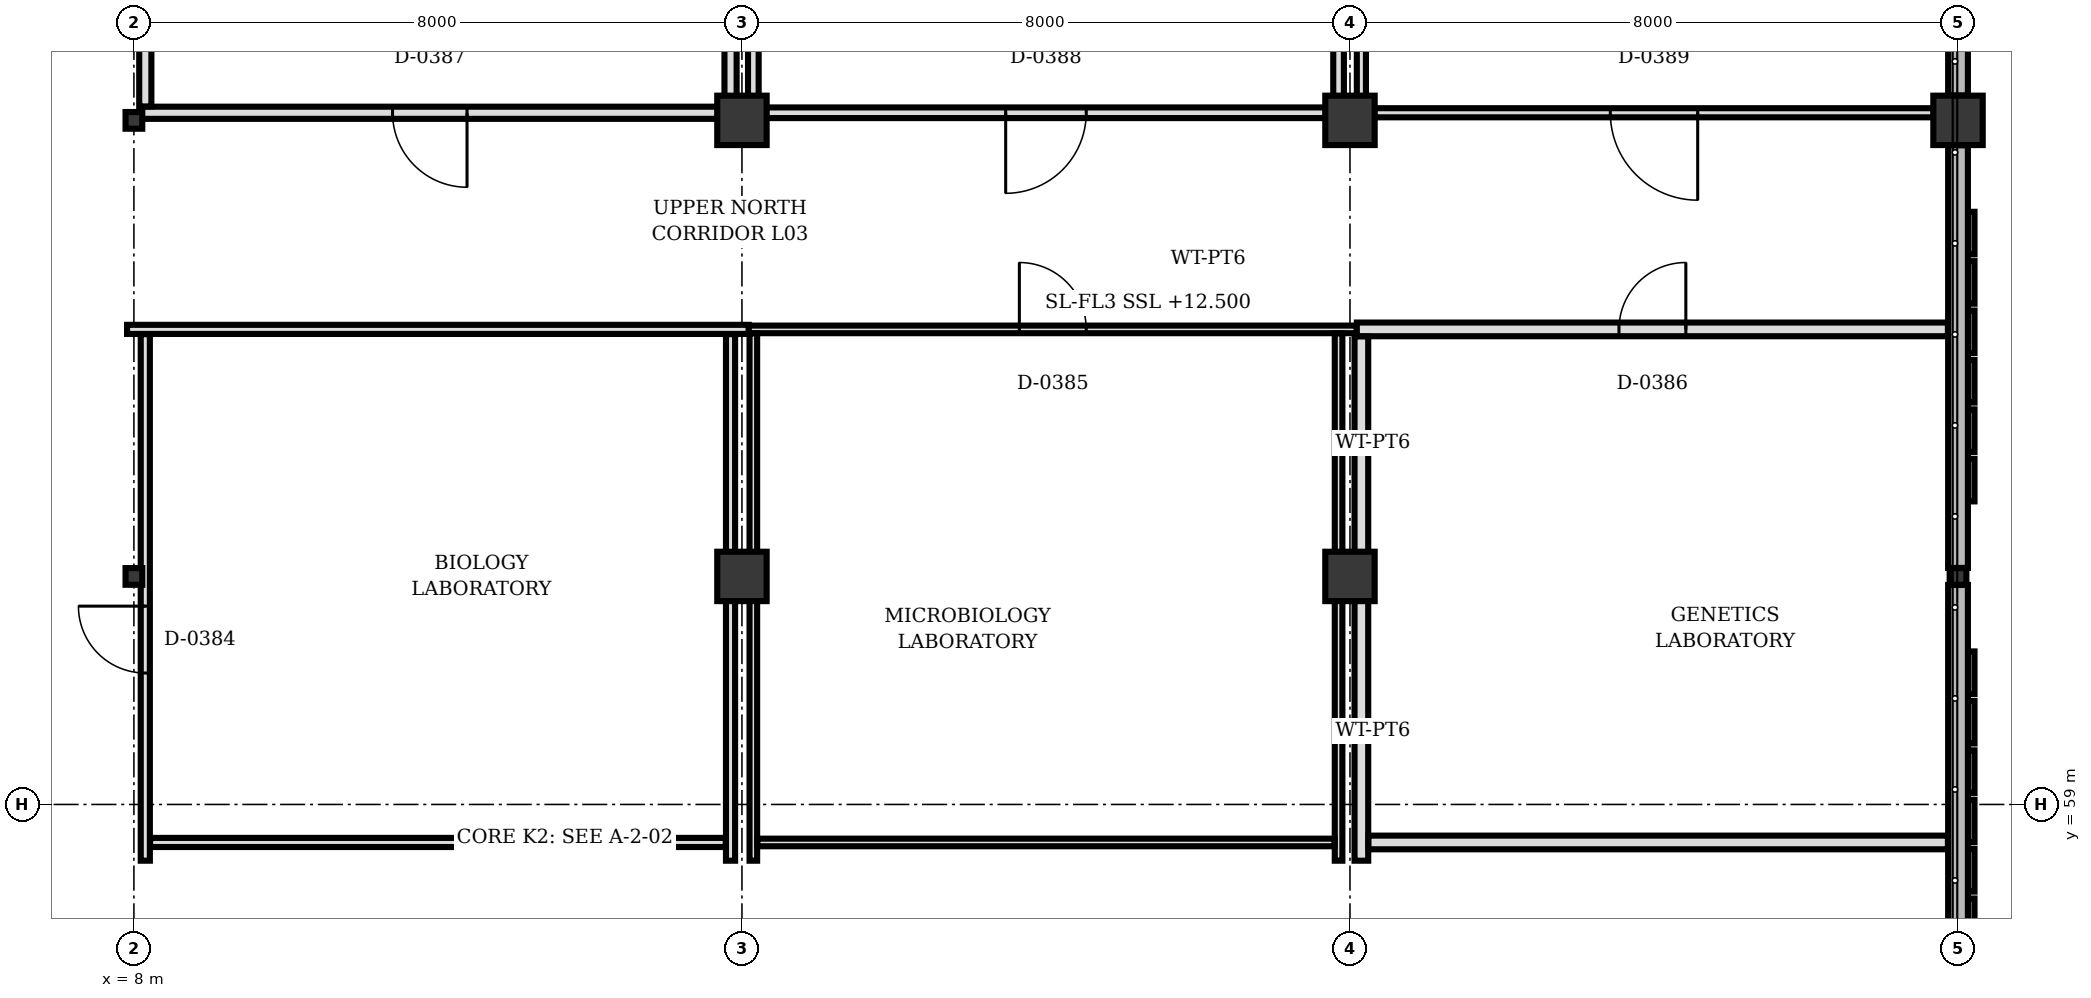
"""IFC4 building model, lengths in metres.
Left out: names, types, materials, properties, quantities, classifications, styles, units other than length and angle.
Written with IfcOpenShell. Run it as: python <this file> out.ifc"""

import sys

from ifc_helpers import new_model, si_unit, direction, frame, frame_2d, origin, origin_2d, place, context, subcontext, project, spatial, rectangle, hollow_rectangle, extrude, element, fill, save


model = new_model("IFC4")
c1 = context("Model", 3, precision=1e-05, world=origin(), true_north=direction((0.0, 1.0)))
c2 = subcontext(c1, "Body", "Model", "MODEL_VIEW")
j1 = project(units=[si_unit("LENGTHUNIT", "METRE"), si_unit("PLANEANGLEUNIT", "RADIAN")], contexts=[c1])
p1 = place(None, origin())
s1 = spatial("IfcSite", under=j1, at=p1, CompositionType="ELEMENT")
p2 = place(p1, origin())
s2 = spatial("IfcBuilding", under=s1, at=p2, CompositionType="ELEMENT")
p3 = place(p2, frame((0.0, 0.0, 12.5)))
s3 = spatial("IfcBuildingStorey", under=s2, at=p3, CompositionType="ELEMENT", Elevation=12.5)
for number, where, z_axis, x_axis in (
    (1, (16.0, 62.0, 0.0), (0.0, 0.0, 1.0), (1.0, 0.0, 0.0)),
    (2, (16.0, 68.0, 0.0), (0.0, 0.0, 1.0), (1.0, 0.0, 0.0)),
    (3, (24.0, 62.0, 0.0), (0.0, 0.0, 1.0), (1.0, 0.0, 0.0)),
    (4, (24.0, 68.0, 0.0), (0.0, 0.0, 1.0), (1.0, 0.0, 0.0)),
):
    element("IfcColumn", number, at=place(p3, frame(where, z_axis=z_axis, x_axis=x_axis)), inside=s3, PredefinedType="COLUMN", context=c2, shape_type="SweptSolid", body=[
        extrude(rectangle(XDim=0.65, YDim=0.65, at=origin_2d()), origin(), (0.0, 0.0, 1.0), 4.0),
    ])
p4 = place(p3, frame((32.0, 62.0, 0.0), z_axis=(0.0, 0.0, 1.0), x_axis=(1.0, 0.0, 0.0)))
e5 = element("IfcColumn", 5, at=p4, inside=s3, PredefinedType="COLUMN", context=c2, shape_type="SweptSolid", body=[
    extrude(hollow_rectangle(XDim=0.22, YDim=0.22, WallThickness=0.01, at=origin_2d()), origin(), (0.0, 0.0, 1.0), 4.0),
])
p5 = place(p3, frame((32.0, 68.0, 0.0), z_axis=(0.0, 0.0, 1.0), x_axis=(1.0, 0.0, 0.0)))
e6 = element("IfcColumn", 6, at=p5, inside=s3, PredefinedType="COLUMN", context=c2, shape_type="SweptSolid", body=[
    extrude(rectangle(XDim=0.65, YDim=0.65, at=origin_2d()), origin(), (0.0, 0.0, 1.0), 4.0),
])
for number, where, z_axis, x_axis in (
    (7, (8.0, 62.0, 0.0), (0.0, 0.0, 1.0), (1.0, 0.0, 0.0)),
    (8, (8.0, 68.0, 0.0), (0.0, 0.0, 1.0), (1.0, 0.0, 0.0)),
):
    element("IfcColumn", number, at=place(p3, frame(where, z_axis=z_axis, x_axis=x_axis)), inside=s3, PredefinedType="COLUMN", context=c2, shape_type="SweptSolid", body=[
        extrude(hollow_rectangle(XDim=0.22, YDim=0.22, WallThickness=0.01, at=origin_2d()), origin(), (0.0, 0.0, 1.0), 4.0),
    ])
p6 = place(p3, frame((32.0, 75.673, 0.0), z_axis=(0.0, 0.0, 1.0), x_axis=(0.0, -1.0, 0.0)))
e9 = element("IfcWall", 9, at=p6, inside=s3, PredefinedType="SOLIDWALL", context=c2, shape_type="SweptSolid", body=[
    extrude(rectangle(XDim=7.346, YDim=0.26, at=frame_2d((3.673, 0.0))), origin(), (0.0, 0.0, 1.0), 3.152),
])
p7 = place(p6, frame((4.889, 0.0, 0.9)))
e10 = element("IfcOpeningElement", 10, at=p7, cuts=e9, PredefinedType="OPENING", context=c2, shape_type="SweptSolid", body=[
    extrude(rectangle(XDim=0.8, YDim=1.1, at=frame_2d((0.4, 0.55))), frame((0.0, 0.14, 0.0), z_axis=(0.0, -1.0, 0.0), x_axis=(1.0, 0.0, 0.0)), (0.0, 0.0, 1.0), 0.28),
])
for number, where, z_axis, x_axis in (
    (11, (32.0, 67.673, 0.0), (0.0, 0.0, 1.0), (0.0, -1.0, 0.0)),
    (12, (32.0, 61.888, 0.0), (0.0, 0.0, 1.0), (0.0, -1.0, 0.0)),
):
    element("IfcWall", number, at=place(p3, frame(where, z_axis=z_axis, x_axis=x_axis)), inside=s3, PredefinedType="SOLIDWALL", context=c2, shape_type="SweptSolid", body=[
        extrude(rectangle(XDim=5.561, YDim=0.26, at=frame_2d((2.781, 0.0))), origin(), (0.0, 0.0, 1.0), 3.002),
    ])
p8 = place(p3, frame((7.91, 65.25, 0.0), z_axis=(0.0, 0.0, 1.0), x_axis=(1.0, 0.0, 0.0)))
e13 = element("IfcWall", 13, at=p8, inside=s3, PredefinedType="PARTITIONING", context=c2, shape_type="SweptSolid", body=[
    extrude(rectangle(XDim=8.18, YDim=0.12, at=frame_2d((4.09, 0.0))), origin(), (0.0, 0.0, 1.0), 3.152),
])
p9 = place(p3, frame((15.85, 65.187, 0.0), z_axis=(0.0, 0.0, 1.0), x_axis=(0.0, -1.0, 0.0)))
e14 = element("IfcWall", 14, at=p9, inside=s3, PredefinedType="PARTITIONING", context=c2, shape_type="SweptSolid", body=[
    extrude(rectangle(XDim=2.87, YDim=0.12, at=frame_2d((1.435, 0.0))), origin(), (0.0, 0.0, 1.0), 3.002),
])
p10 = place(p3, frame((15.85, 61.683, 0.0), z_axis=(0.0, 0.0, 1.0), x_axis=(0.0, -1.0, 0.0)))
e15 = element("IfcWall", 15, at=p10, inside=s3, PredefinedType="PARTITIONING", context=c2, shape_type="SweptSolid", body=[
    extrude(rectangle(XDim=3.423, YDim=0.12, at=frame_2d((1.711, 0.0))), origin(), (0.0, 0.0, 1.0), 3.002),
])
p11 = place(p3, frame((8.15, 58.26, 0.0), z_axis=(0.0, 0.0, 1.0), x_axis=(0.0, 1.0, 0.0)))
e16 = element("IfcWall", 16, at=p11, inside=s3, PredefinedType="PARTITIONING", context=c2, shape_type="SweptSolid", body=[
    extrude(rectangle(XDim=6.927, YDim=0.12, at=frame_2d((3.463, 0.0))), origin(), (0.0, 0.0, 1.0), 3.002),
])
p12 = place(p11, frame((2.469, 0.0, 0.0)))
e17 = element("IfcOpeningElement", 17, at=p12, cuts=e16, PredefinedType="OPENING", context=c2, shape_type="SweptSolid", body=[
    extrude(rectangle(XDim=0.88, YDim=2.1, at=frame_2d((0.44, 1.05))), frame((0.0, 0.07, 0.0), z_axis=(0.0, -1.0, 0.0), x_axis=(1.0, 0.0, 0.0)), (0.0, 0.0, 1.0), 0.14),
])
p13 = place(p3, frame((15.787, 58.5, 0.0), z_axis=(0.0, 0.0, 1.0), x_axis=(-1.0, 0.0, 0.0)))
e18 = element("IfcWall", 18, at=p13, inside=s3, PredefinedType="PARTITIONING", context=c2, shape_type="SweptSolid", body=[
    extrude(rectangle(XDim=7.574, YDim=0.12, at=frame_2d((3.787, 0.0))), origin(), (0.0, 0.0, 1.0), 3.7),
])
p14 = place(p3, frame((16.09, 65.25, 0.0), z_axis=(0.0, 0.0, 1.0), x_axis=(1.0, 0.0, 0.0)))
e19 = element("IfcWall", 19, at=p14, inside=s3, PredefinedType="PARTITIONING", context=c2, shape_type="SweptSolid", body=[
    extrude(rectangle(XDim=8.0, YDim=0.1, at=frame_2d((4.0, 0.0))), origin(), (0.0, 0.0, 1.0), 3.152),
])
p15 = place(p14, frame((3.56, 0.0, 0.0)))
e20 = element("IfcOpeningElement", 20, at=p15, cuts=e19, PredefinedType="OPENING", context=c2, shape_type="SweptSolid", body=[
    extrude(rectangle(XDim=0.88, YDim=2.1, at=frame_2d((0.44, 1.05))), frame((0.0, 0.06, 0.0), z_axis=(0.0, -1.0, 0.0), x_axis=(1.0, 0.0, 0.0)), (0.0, 0.0, 1.0), 0.12),
])
p16 = place(p3, frame((23.85, 65.197, 0.0), z_axis=(0.0, 0.0, 1.0), x_axis=(0.0, -1.0, 0.0)))
e21 = element("IfcWall", 21, at=p16, inside=s3, PredefinedType="PARTITIONING", context=c2, shape_type="SweptSolid", body=[
    extrude(rectangle(XDim=2.88, YDim=0.1, at=frame_2d((1.44, 0.0))), origin(), (0.0, 0.0, 1.0), 3.002),
])
for number, where, z_axis, x_axis in (
    (22, (23.85, 61.683, 0.0), (0.0, 0.0, 1.0), (0.0, -1.0, 0.0)),
    (23, (16.15, 58.26, 0.0), (0.0, 0.0, 1.0), (0.0, 1.0, 0.0)),
):
    element("IfcWall", number, at=place(p3, frame(where, z_axis=z_axis, x_axis=x_axis)), inside=s3, PredefinedType="PARTITIONING", context=c2, shape_type="SweptSolid", body=[
        extrude(rectangle(XDim=3.423, YDim=0.1, at=frame_2d((1.711, 0.0))), origin(), (0.0, 0.0, 1.0), 3.002),
    ])
p17 = place(p3, frame((16.15, 62.317, 0.0), z_axis=(0.0, 0.0, 1.0), x_axis=(0.0, 1.0, 0.0)))
e24 = element("IfcWall", 24, at=p17, inside=s3, PredefinedType="PARTITIONING", context=c2, shape_type="SweptSolid", body=[
    extrude(rectangle(XDim=2.88, YDim=0.1, at=frame_2d((1.44, 0.0))), origin(), (0.0, 0.0, 1.0), 3.002),
])
p18 = place(p3, frame((23.797, 58.5, 0.0), z_axis=(0.0, 0.0, 1.0), x_axis=(-1.0, 0.0, 0.0)))
e25 = element("IfcWall", 25, at=p18, inside=s3, PredefinedType="PARTITIONING", context=c2, shape_type="SweptSolid", body=[
    extrude(rectangle(XDim=7.594, YDim=0.1, at=frame_2d((3.797, 0.0))), origin(), (0.0, 0.0, 1.0), 3.152),
])
p19 = place(p3, frame((24.09, 65.25, 0.0), z_axis=(0.0, 0.0, 1.0), x_axis=(1.0, 0.0, 0.0)))
e26 = element("IfcWall", 26, at=p19, inside=s3, PredefinedType="PARTITIONING", context=c2, shape_type="SweptSolid", body=[
    extrude(rectangle(XDim=7.777, YDim=0.18, at=frame_2d((3.888, 0.0))), origin(), (0.0, 0.0, 1.0), 3.152),
])
p20 = place(p19, frame((3.449, 0.0, 0.0)))
e27 = element("IfcOpeningElement", 27, at=p20, cuts=e26, PredefinedType="OPENING", context=c2, shape_type="SweptSolid", body=[
    extrude(rectangle(XDim=0.88, YDim=2.1, at=frame_2d((0.44, 1.05))), frame((0.0, 0.1, 0.0), z_axis=(0.0, -1.0, 0.0), x_axis=(1.0, 0.0, 0.0)), (0.0, 0.0, 1.0), 0.2),
])
p21 = place(p3, frame((24.15, 58.26, 0.0), z_axis=(0.0, 0.0, 1.0), x_axis=(0.0, 1.0, 0.0)))
e28 = element("IfcWall", 28, at=p21, inside=s3, PredefinedType="PARTITIONING", context=c2, shape_type="SweptSolid", body=[
    extrude(rectangle(XDim=3.423, YDim=0.18, at=frame_2d((1.711, 0.0))), origin(), (0.0, 0.0, 1.0), 3.002),
])
p22 = place(p3, frame((24.15, 62.317, 0.0), z_axis=(0.0, 0.0, 1.0), x_axis=(0.0, 1.0, 0.0)))
e29 = element("IfcWall", 29, at=p22, inside=s3, PredefinedType="PARTITIONING", context=c2, shape_type="SweptSolid", body=[
    extrude(rectangle(XDim=2.84, YDim=0.18, at=frame_2d((1.42, 0.0))), origin(), (0.0, 0.0, 1.0), 3.002),
])
p23 = place(p3, frame((31.867, 58.5, 0.0), z_axis=(0.0, 0.0, 1.0), x_axis=(-1.0, 0.0, 0.0)))
e30 = element("IfcWall", 30, at=p23, inside=s3, PredefinedType="PARTITIONING", context=c2, shape_type="SweptSolid", body=[
    extrude(rectangle(XDim=7.624, YDim=0.18, at=frame_2d((3.812, 0.0))), origin(), (0.0, 0.0, 1.0), 3.152),
])
p24 = place(p3, frame((15.85, 75.683, 0.0), z_axis=(0.0, 0.0, 1.0), x_axis=(0.0, -1.0, 0.0)))
e31 = element("IfcWall", 31, at=p24, inside=s3, PredefinedType="PARTITIONING", context=c2, shape_type="SweptSolid", body=[
    extrude(rectangle(XDim=7.366, YDim=0.16, at=frame_2d((3.683, 0.0))), origin(), (0.0, 0.0, 1.0), 3.002),
])
p25 = place(p3, frame((15.683, 68.1, 0.0), z_axis=(0.0, 0.0, 1.0), x_axis=(-1.0, 0.0, 0.0)))
e32 = element("IfcWall", 32, at=p25, inside=s3, PredefinedType="PARTITIONING", context=c2, shape_type="SweptSolid", body=[
    extrude(rectangle(XDim=7.581, YDim=0.16, at=frame_2d((3.791, 0.0))), origin(), (0.0, 0.0, 1.0), 3.002),
])
p26 = place(p25, frame((3.3, 0.0, 0.0)))
e33 = element("IfcOpeningElement", 33, at=p26, cuts=e32, PredefinedType="OPENING", context=c2, shape_type="SweptSolid", body=[
    extrude(rectangle(XDim=0.98, YDim=2.2, at=frame_2d((0.49, 1.1))), frame((0.0, 0.09, 0.0), z_axis=(0.0, -1.0, 0.0), x_axis=(1.0, 0.0, 0.0)), (0.0, 0.0, 1.0), 0.18),
])
p27 = place(p3, frame((8.15, 68.183, 0.0), z_axis=(0.0, 0.0, 1.0), x_axis=(0.0, 1.0, 0.0)))
e34 = element("IfcWall", 34, at=p27, inside=s3, PredefinedType="PARTITIONING", context=c2, shape_type="SweptSolid", body=[
    extrude(rectangle(XDim=7.5, YDim=0.16, at=frame_2d((3.75, 0.0))), origin(), (0.0, 0.0, 1.0), 3.002),
])
p28 = place(p3, frame((23.85, 75.683, 0.0), z_axis=(0.0, 0.0, 1.0), x_axis=(0.0, -1.0, 0.0)))
e35 = element("IfcWall", 35, at=p28, inside=s3, PredefinedType="PARTITIONING", context=c2, shape_type="SweptSolid", body=[
    extrude(rectangle(XDim=7.366, YDim=0.14, at=frame_2d((3.683, 0.0))), origin(), (0.0, 0.0, 1.0), 3.002),
])
p29 = place(p3, frame((23.683, 68.1, 0.0), z_axis=(0.0, 0.0, 1.0), x_axis=(-1.0, 0.0, 0.0)))
e36 = element("IfcWall", 36, at=p29, inside=s3, PredefinedType="PARTITIONING", context=c2, shape_type="SweptSolid", body=[
    extrude(rectangle(XDim=7.366, YDim=0.14, at=frame_2d((3.683, 0.0))), origin(), (0.0, 0.0, 1.0), 3.002),
])
p30 = place(p29, frame((3.153, 0.0, 0.0)))
e37 = element("IfcOpeningElement", 37, at=p30, cuts=e36, PredefinedType="OPENING", context=c2, shape_type="SweptSolid", body=[
    extrude(rectangle(XDim=1.06, YDim=2.2, at=frame_2d((0.53, 1.1))), frame((0.0, 0.08, 0.0), z_axis=(0.0, -1.0, 0.0), x_axis=(1.0, 0.0, 0.0)), (0.0, 0.0, 1.0), 0.16),
])
p31 = place(p3, frame((16.15, 68.317, 0.0), z_axis=(0.0, 0.0, 1.0), x_axis=(0.0, 1.0, 0.0)))
e38 = element("IfcWall", 38, at=p31, inside=s3, PredefinedType="PARTITIONING", context=c2, shape_type="SweptSolid", body=[
    extrude(rectangle(XDim=7.366, YDim=0.14, at=frame_2d((3.683, 0.0))), origin(), (0.0, 0.0, 1.0), 3.002),
])
p32 = place(p3, frame((31.683, 68.1, 0.0), z_axis=(0.0, 0.0, 1.0), x_axis=(-1.0, 0.0, 0.0)))
e39 = element("IfcWall", 39, at=p32, inside=s3, PredefinedType="PARTITIONING", context=c2, shape_type="SweptSolid", body=[
    extrude(rectangle(XDim=7.366, YDim=0.12, at=frame_2d((3.683, 0.0))), origin(), (0.0, 0.0, 1.0), 3.002),
])
p33 = place(p32, frame((3.108, 0.0, 0.0)))
e40 = element("IfcOpeningElement", 40, at=p33, cuts=e39, PredefinedType="OPENING", context=c2, shape_type="SweptSolid", body=[
    extrude(rectangle(XDim=1.15, YDim=2.2, at=frame_2d((0.575, 1.1))), frame((0.0, 0.07, 0.0), z_axis=(0.0, -1.0, 0.0), x_axis=(1.0, 0.0, 0.0)), (0.0, 0.0, 1.0), 0.14),
])
p34 = place(p3, frame((24.15, 68.317, 0.0), z_axis=(0.0, 0.0, 1.0), x_axis=(0.0, 1.0, 0.0)))
e41 = element("IfcWall", 41, at=p34, inside=s3, PredefinedType="PARTITIONING", context=c2, shape_type="SweptSolid", body=[
    extrude(rectangle(XDim=7.366, YDim=0.12, at=frame_2d((3.683, 0.0))), origin(), (0.0, 0.0, 1.0), 3.002),
])
p35 = place(p12, origin())
e42 = element("IfcDoor", 42, at=p35, inside=s3, OperationType="SINGLE_SWING_RIGHT", PredefinedType="DOOR", context=c2, shape_type="SweptSolid", body=[
    extrude(rectangle(XDim=0.88, YDim=2.1, at=frame_2d((0.44, 1.05))), frame((0.0, 0.025, 0.0), z_axis=(0.0, -1.0, 0.0), x_axis=(1.0, 0.0, 0.0)), (0.0, 0.0, 1.0), 0.05),
])
fill(e17, e42)
p36 = place(p15, origin())
e43 = element("IfcDoor", 43, at=p36, inside=s3, OperationType="SINGLE_SWING_LEFT", PredefinedType="DOOR", context=c2, shape_type="SweptSolid", body=[
    extrude(rectangle(XDim=0.88, YDim=2.1, at=frame_2d((0.44, 1.05))), frame((0.0, 0.025, 0.0), z_axis=(0.0, -1.0, 0.0), x_axis=(1.0, 0.0, 0.0)), (0.0, 0.0, 1.0), 0.05),
])
fill(e20, e43)
p37 = place(p20, origin())
e44 = element("IfcDoor", 44, at=p37, inside=s3, OperationType="SINGLE_SWING_RIGHT", PredefinedType="DOOR", context=c2, shape_type="SweptSolid", body=[
    extrude(rectangle(XDim=0.88, YDim=2.1, at=frame_2d((0.44, 1.05))), frame((0.0, 0.025, 0.0), z_axis=(0.0, -1.0, 0.0), x_axis=(1.0, 0.0, 0.0)), (0.0, 0.0, 1.0), 0.05),
])
fill(e27, e44)
p38 = place(p26, origin())
e45 = element("IfcDoor", 45, at=p38, inside=s3, OperationType="SINGLE_SWING_LEFT", PredefinedType="DOOR", context=c2, shape_type="SweptSolid", body=[
    extrude(rectangle(XDim=0.98, YDim=2.2, at=frame_2d((0.49, 1.1))), frame((0.0, 0.025, 0.0), z_axis=(0.0, -1.0, 0.0), x_axis=(1.0, 0.0, 0.0)), (0.0, 0.0, 1.0), 0.05),
])
fill(e33, e45)
p39 = place(p30, origin())
e46 = element("IfcDoor", 46, at=p39, inside=s3, OperationType="SINGLE_SWING_RIGHT", PredefinedType="DOOR", context=c2, shape_type="SweptSolid", body=[
    extrude(rectangle(XDim=1.06, YDim=2.2, at=frame_2d((0.53, 1.1))), frame((0.0, 0.025, 0.0), z_axis=(0.0, -1.0, 0.0), x_axis=(1.0, 0.0, 0.0)), (0.0, 0.0, 1.0), 0.05),
])
fill(e37, e46)
p40 = place(p33, origin())
e47 = element("IfcDoor", 47, at=p40, inside=s3, OperationType="SINGLE_SWING_LEFT", PredefinedType="DOOR", context=c2, shape_type="SweptSolid", body=[
    extrude(rectangle(XDim=1.15, YDim=2.2, at=frame_2d((0.575, 1.1))), frame((0.0, 0.025, 0.0), z_axis=(0.0, -1.0, 0.0), x_axis=(1.0, 0.0, 0.0)), (0.0, 0.0, 1.0), 0.05),
])
fill(e40, e47)
save(model, sys.argv[1])
